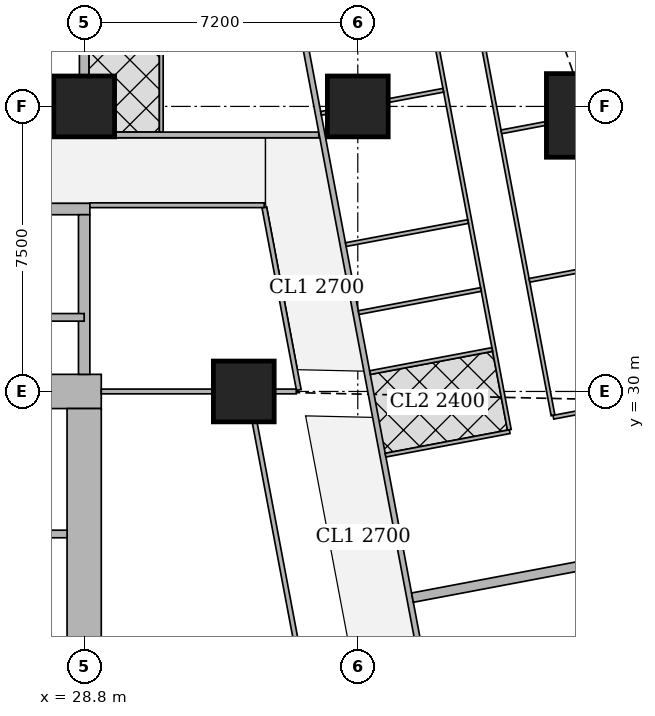
"""IFC4 building model, lengths in metres.
Left out: names, types, materials, properties, quantities, classifications, styles, units other than length and angle.
Written with IfcOpenShell. Run it as: python <this file> out.ifc"""

import sys

from ifc_helpers import new_model, si_unit, direction, frame, frame_2d, origin, origin_2d, place, context, subcontext, project, spatial, rectangle, extrude, element, fill, save


model = new_model("IFC4")
c1 = context("Model", 3, precision=1e-05, world=origin(), true_north=direction((0.0, 1.0)))
c2 = subcontext(c1, "Body", "Model", "MODEL_VIEW")
j1 = project(units=[si_unit("LENGTHUNIT", "METRE"), si_unit("PLANEANGLEUNIT", "RADIAN")], contexts=[c1])
p1 = place(None, origin())
s1 = spatial("IfcSite", under=j1, at=p1, CompositionType="ELEMENT")
p2 = place(p1, origin())
s2 = spatial("IfcBuilding", under=s1, at=p2, CompositionType="ELEMENT")
p3 = place(p2, frame((0.0, 0.0, 81.65)))
s3 = spatial("IfcBuildingStorey", under=s2, at=p3, CompositionType="ELEMENT", Elevation=81.65)
for number, where, z_axis, x_axis in (
    (1, (33.0, 30.0, 0.0), (0.0, 0.0, 1.0), (1.0, 0.0, 0.0)),
    (2, (28.8, 37.5, 0.0), (0.0, 0.0, 1.0), (1.0, 0.0, 0.0)),
    (3, (36.0, 37.5, 0.0), (0.0, 0.0, 1.0), (1.0, 0.0, 0.0)),
):
    element("IfcColumn", number, at=place(p3, frame(where, z_axis=z_axis, x_axis=x_axis)), inside=s3, PredefinedType="COLUMN", context=c2, shape_type="SweptSolid", body=[
        extrude(rectangle(XDim=1.6, YDim=1.6, at=origin_2d()), origin(), (0.0, 0.0, 1.0), 3.75),
    ])
p4 = place(p3, frame((42.064, 37.263, 0.0), z_axis=(0.0, 0.0, 1.0), x_axis=(1.0, 0.0, 0.0)))
e4 = element("IfcColumn", 4, at=p4, inside=s3, PredefinedType="COLUMN", context=c2, shape_type="SweptSolid", body=[
    extrude(rectangle(XDim=2.2, YDim=2.2, at=origin_2d()), origin(), (0.0, 0.0, 1.0), 3.75),
])
p5 = place(p3, frame((13.95, 30.0, 0.0), z_axis=(0.0, 0.0, 1.0), x_axis=(1.0, 0.0, 0.0)))
e5 = element("IfcWall", 5, at=p5, inside=s3, PredefinedType="SHEAR", context=c2, shape_type="SweptSolid", body=[
    extrude(rectangle(XDim=15.3, YDim=0.9, at=frame_2d((7.65, 0.0))), origin(), (0.0, 0.0, 1.0), 3.75),
])
p6 = place(p5, frame((4.45, 0.0, 0.0)))
e6 = element("IfcOpeningElement", 6, at=p6, cuts=e5, PredefinedType="OPENING", context=c2, shape_type="SweptSolid", body=[
    extrude(rectangle(XDim=1.8, YDim=2.1, at=frame_2d((0.9, 1.05))), frame((0.0, 0.46, 0.0), z_axis=(0.0, -1.0, 0.0), x_axis=(1.0, 0.0, 0.0)), (0.0, 0.0, 1.0), 0.92),
])
p7 = place(p5, frame((10.7, 0.0, 0.0)))
e7 = element("IfcOpeningElement", 7, at=p7, cuts=e5, PredefinedType="OPENING", context=c2, shape_type="SweptSolid", body=[
    extrude(rectangle(XDim=1.1, YDim=2.1, at=frame_2d((0.55, 1.05))), frame((0.0, 0.46, 0.0), z_axis=(0.0, -1.0, 0.0), x_axis=(1.0, 0.0, 0.0)), (0.0, 0.0, 1.0), 0.92),
])
p8 = place(p3, frame((28.8, 15.45, 0.0), z_axis=(0.0, 0.0, 1.0), x_axis=(0.0, 1.0, 0.0)))
e8 = element("IfcWall", 8, at=p8, inside=s3, PredefinedType="SHEAR", context=c2, shape_type="SweptSolid", body=[
    extrude(rectangle(XDim=14.1, YDim=0.9, at=frame_2d((7.05, 0.0))), origin(), (0.0, 0.0, 1.0), 3.75),
])
p9 = place(p3, frame((21.45, 34.8, 0.0), z_axis=(0.0, 0.0, 1.0), x_axis=(1.0, 0.0, 0.0)))
e9 = element("IfcWall", 9, at=p9, inside=s3, PredefinedType="SHEAR", context=c2, shape_type="SweptSolid", body=[
    extrude(rectangle(XDim=7.5, YDim=0.3, at=frame_2d((3.75, 0.0))), origin(), (0.0, 0.0, 1.0), 3.75),
])
p10 = place(p9, frame((0.5, 0.0, 0.0)))
e10 = element("IfcOpeningElement", 10, at=p10, cuts=e9, PredefinedType="OPENING", context=c2, shape_type="SweptSolid", body=[
    extrude(rectangle(XDim=1.1, YDim=2.1, at=frame_2d((0.55, 1.05))), frame((0.0, 0.16, 0.0), z_axis=(0.0, -1.0, 0.0), x_axis=(1.0, 0.0, 0.0)), (0.0, 0.0, 1.0), 0.32),
])
p11 = place(p3, frame((28.8, 30.45, 0.0), z_axis=(0.0, 0.0, 1.0), x_axis=(0.0, 1.0, 0.0)))
e11 = element("IfcWall", 11, at=p11, inside=s3, PredefinedType="SHEAR", context=c2, shape_type="SweptSolid", body=[
    extrude(rectangle(XDim=4.2, YDim=0.3, at=frame_2d((2.1, 0.0))), origin(), (0.0, 0.0, 1.0), 3.75),
])
p12 = place(p3, frame((22.401, 36.75, 0.0), z_axis=(0.0, 0.0, 1.0), x_axis=(1.0, 0.0, 0.0)))
e12 = element("IfcWall", 12, at=p12, inside=s3, PredefinedType="SOLIDWALL", context=c2, shape_type="SweptSolid", body=[
    extrude(rectangle(XDim=5.598, YDim=0.15, at=frame_2d((2.799, 0.0))), origin(), (0.0, 0.0, 1.0), 3.5),
])
p13 = place(p3, frame((29.601, 36.75, 0.0), z_axis=(0.0, 0.0, 1.0), x_axis=(1.0, 0.0, 0.0)))
e13 = element("IfcWall", 13, at=p13, inside=s3, PredefinedType="SOLIDWALL", context=c2, shape_type="SweptSolid", body=[
    extrude(rectangle(XDim=5.372, YDim=0.15, at=frame_2d((2.686, 0.0))), origin(), (0.0, 0.0, 1.0), 3.5),
])
p14 = place(p13, frame((2.845, 0.0, 0.0)))
e14 = element("IfcOpeningElement", 14, at=p14, cuts=e13, PredefinedType="OPENING", context=c2, shape_type="SweptSolid", body=[
    extrude(rectangle(XDim=1.0, YDim=2.1, at=frame_2d((0.5, 1.05))), frame((0.0, 0.085, 0.0), z_axis=(0.0, -1.0, 0.0), x_axis=(1.0, 0.0, 0.0)), (0.0, 0.0, 1.0), 0.17),
])
p15 = place(p3, frame((33.382, 45.65, 0.0), z_axis=(0.0, 0.0, 1.0), x_axis=(0.185593544777, -0.982626600565, 0.0)))
e15 = element("IfcWall", 15, at=p15, inside=s3, PredefinedType="SOLIDWALL", context=c2, shape_type="SweptSolid", body=[
    extrude(rectangle(XDim=47.118, YDim=0.15, at=frame_2d((23.559, 0.0))), origin(), (0.0, 0.0, 1.0), 2.2),
])
p16 = place(p15, frame((19.054, 0.0, 0.0)))
e16 = element("IfcOpeningElement", 16, at=p16, cuts=e15, PredefinedType="OPENING", context=c2, shape_type="SweptSolid", body=[
    extrude(rectangle(XDim=1.0, YDim=2.1, at=frame_2d((0.5, 1.05))), frame((0.0, 0.085, 0.0), z_axis=(0.0, -1.0, 0.0), x_axis=(1.0, 0.0, 0.0)), (0.0, 0.0, 1.0), 0.17),
])
p17 = place(p15, frame((22.87, 0.0, 0.0)))
e17 = element("IfcOpeningElement", 17, at=p17, cuts=e15, PredefinedType="OPENING", context=c2, shape_type="SweptSolid", body=[
    extrude(rectangle(XDim=1.0, YDim=2.1, at=frame_2d((0.5, 1.05))), frame((0.0, 0.085, 0.0), z_axis=(0.0, -1.0, 0.0), x_axis=(1.0, 0.0, 0.0)), (0.0, 0.0, 1.0), 0.17),
])
p18 = place(p15, frame((33.833, 0.0, 0.0)))
e18 = element("IfcOpeningElement", 18, at=p18, cuts=e15, PredefinedType="OPENING", context=c2, shape_type="SweptSolid", body=[
    extrude(rectangle(XDim=1.0, YDim=2.1, at=frame_2d((0.5, 1.05))), frame((0.0, 0.085, 0.0), z_axis=(0.0, -1.0, 0.0), x_axis=(1.0, 0.0, 0.0)), (0.0, 0.0, 1.0), 0.17),
])
p19 = place(p3, frame((38.862, 41.42, 0.0), z_axis=(0.0, 0.0, 1.0), x_axis=(0.185529020159, -0.982638785454, 0.0)))
e19 = element("IfcWall", 19, at=p19, inside=s3, PredefinedType="PARTITIONING", context=c2, shape_type="SweptSolid", body=[
    extrude(rectangle(XDim=12.262, YDim=0.1, at=frame_2d((6.131, 0.0))), origin(), (0.0, 0.0, 1.0), 2.5),
])
p20 = place(p19, frame((11.212, 0.0, 0.0)))
e20 = element("IfcOpeningElement", 20, at=p20, cuts=e19, PredefinedType="OPENING", context=c2, shape_type="SweptSolid", body=[
    extrude(rectangle(XDim=0.9, YDim=2.1, at=frame_2d((0.45, 1.05))), frame((0.0, 0.06, 0.0), z_axis=(0.0, -1.0, 0.0), x_axis=(1.0, 0.0, 0.0)), (0.0, 0.0, 1.0), 0.12),
])
p21 = place(p19, frame((7.555, 0.0, 0.0)))
e21 = element("IfcOpeningElement", 21, at=p21, cuts=e19, PredefinedType="OPENING", context=c2, shape_type="SweptSolid", body=[
    extrude(rectangle(XDim=0.9, YDim=2.1, at=frame_2d((0.45, 1.05))), frame((0.0, 0.06, 0.0), z_axis=(0.0, -1.0, 0.0), x_axis=(1.0, 0.0, 0.0)), (0.0, 0.0, 1.0), 0.12),
])
p22 = place(p19, frame((3.579, 0.0, 0.0)))
e22 = element("IfcOpeningElement", 22, at=p22, cuts=e19, PredefinedType="OPENING", context=c2, shape_type="SweptSolid", body=[
    extrude(rectangle(XDim=0.9, YDim=2.1, at=frame_2d((0.45, 1.05))), frame((0.0, 0.06, 0.0), z_axis=(0.0, -1.0, 0.0), x_axis=(1.0, 0.0, 0.0)), (0.0, 0.0, 1.0), 0.12),
])
p23 = place(p3, frame((37.473, 42.309, 0.0), z_axis=(0.0, 0.0, 1.0), x_axis=(0.185570636839, -0.982630927024, 0.0)))
e23 = element("IfcWall", 23, at=p23, inside=s3, PredefinedType="PARTITIONING", context=c2, shape_type="SweptSolid", body=[
    extrude(rectangle(XDim=13.553, YDim=0.1, at=frame_2d((6.777, 0.0))), origin(), (0.0, 0.0, 1.0), 2.5),
])
p24 = place(p23, frame((12.049, 0.0, 0.0)))
e24 = element("IfcOpeningElement", 24, at=p24, cuts=e23, PredefinedType="OPENING", context=c2, shape_type="SweptSolid", body=[
    extrude(rectangle(XDim=0.9, YDim=2.1, at=frame_2d((0.45, 1.05))), frame((0.0, 0.06, 0.0), z_axis=(0.0, -1.0, 0.0), x_axis=(1.0, 0.0, 0.0)), (0.0, 0.0, 1.0), 0.12),
])
p25 = place(p23, frame((8.427, 0.0, 0.0)))
e25 = element("IfcOpeningElement", 25, at=p25, cuts=e23, PredefinedType="OPENING", context=c2, shape_type="SweptSolid", body=[
    extrude(rectangle(XDim=0.9, YDim=2.1, at=frame_2d((0.45, 1.05))), frame((0.0, 0.06, 0.0), z_axis=(0.0, -1.0, 0.0), x_axis=(1.0, 0.0, 0.0)), (0.0, 0.0, 1.0), 0.12),
])
p26 = place(p23, frame((2.853, 0.0, 0.0)))
e26 = element("IfcOpeningElement", 26, at=p26, cuts=e23, PredefinedType="OPENING", context=c2, shape_type="SweptSolid", body=[
    extrude(rectangle(XDim=0.9, YDim=2.1, at=frame_2d((0.45, 1.05))), frame((0.0, 0.06, 0.0), z_axis=(0.0, -1.0, 0.0), x_axis=(1.0, 0.0, 0.0)), (0.0, 0.0, 1.0), 0.12),
])
p27 = place(p23, frame((10.14, 0.0, 0.0)))
e27 = element("IfcOpeningElement", 27, at=p27, cuts=e23, PredefinedType="OPENING", context=c2, shape_type="SweptSolid", body=[
    extrude(rectangle(XDim=0.9, YDim=2.1, at=frame_2d((0.45, 1.05))), frame((0.0, 0.06, 0.0), z_axis=(0.0, -1.0, 0.0), x_axis=(1.0, 0.0, 0.0)), (0.0, 0.0, 1.0), 0.12),
])
p28 = place(p23, frame((5.759, 0.0, 0.0)))
e28 = element("IfcOpeningElement", 28, at=p28, cuts=e23, PredefinedType="OPENING", context=c2, shape_type="SweptSolid", body=[
    extrude(rectangle(XDim=0.9, YDim=2.1, at=frame_2d((0.45, 1.05))), frame((0.0, 0.06, 0.0), z_axis=(0.0, -1.0, 0.0), x_axis=(1.0, 0.0, 0.0)), (0.0, 0.0, 1.0), 0.12),
])
p29 = place(p3, frame((40.954, 37.053, 0.0), z_axis=(0.0, 0.0, 1.0), x_axis=(-0.982628652346, -0.185582681276, 0.0)))
e29 = element("IfcWall", 29, at=p29, inside=s3, PredefinedType="PARTITIONING", context=c2, shape_type="SweptSolid", body=[
    extrude(rectangle(XDim=1.196, YDim=0.1, at=frame_2d((0.598, 0.0))), origin(), (0.0, 0.0, 1.0), 2.05),
])
p30 = place(p3, frame((44.693, 33.713, 0.0), z_axis=(0.0, 0.0, 1.0), x_axis=(-0.982623519589, -0.185609856287, 0.0)))
e30 = element("IfcWall", 30, at=p30, inside=s3, PredefinedType="PARTITIONING", context=c2, shape_type="SweptSolid", body=[
    extrude(rectangle(XDim=4.25, YDim=0.1, at=frame_2d((2.125, 0.0))), origin(), (0.0, 0.0, 1.0), 2.2),
])
p31 = place(p3, frame((42.37, 29.553, 0.0), z_axis=(0.0, 0.0, 1.0), x_axis=(-0.98263602344, -0.185543648338, 0.0)))
e31 = element("IfcWall", 31, at=p31, inside=s3, PredefinedType="PARTITIONING", context=c2, shape_type="SweptSolid", body=[
    extrude(rectangle(XDim=1.245, YDim=0.1, at=frame_2d((0.623, 0.0))), origin(), (0.0, 0.0, 1.0), 2.5),
])
p32 = place(p3, frame((38.25, 37.925, 0.0), z_axis=(0.0, 0.0, 1.0), x_axis=(-0.982626127294, -0.185596050493, 0.0)))
e32 = element("IfcWall", 32, at=p32, inside=s3, PredefinedType="PARTITIONING", context=c2, shape_type="SweptSolid", body=[
    extrude(rectangle(XDim=1.465, YDim=0.1, at=frame_2d((0.733, 0.0))), origin(), (0.0, 0.0, 1.0), 3.5),
])
p33 = place(p3, frame((35.19, 37.347, 0.0), z_axis=(0.0, 0.0, 1.0), x_axis=(-0.982404955251, -0.186763229514, 0.0)))
e33 = element("IfcWall", 33, at=p33, inside=s3, PredefinedType="PARTITIONING", context=c2, shape_type="SweptSolid", body=[
    extrude(rectangle(XDim=0.161, YDim=0.1, at=frame_2d((0.081, 0.0))), origin(), (0.0, 0.0, 1.0), 3.5),
])
p34 = place(p3, frame((39.24, 32.683, 0.0), z_axis=(0.0, 0.0, 1.0), x_axis=(-0.982607026909, -0.185697147715, 0.0)))
e34 = element("IfcWall", 34, at=p34, inside=s3, PredefinedType="PARTITIONING", context=c2, shape_type="SweptSolid", body=[
    extrude(rectangle(XDim=3.275, YDim=0.1, at=frame_2d((1.637, 0.0))), origin(), (0.0, 0.0, 1.0), 3.5),
])
p35 = place(p3, frame((39.997, 28.942, 0.0), z_axis=(0.0, 0.0, 1.0), x_axis=(-0.982569883123, -0.185893584556, 0.0)))
e35 = element("IfcWall", 35, at=p35, inside=s3, PredefinedType="PARTITIONING", context=c2, shape_type="SweptSolid", body=[
    extrude(rectangle(XDim=3.324, YDim=0.1, at=frame_2d((1.662, 0.0))), origin(), (0.0, 0.0, 1.0), 3.5),
])
p36 = place(p3, frame((39.538, 31.104, 0.0), z_axis=(0.0, 0.0, 1.0), x_axis=(-0.982610347627, -0.185679575441, 0.0)))
e36 = element("IfcWall", 36, at=p36, inside=s3, PredefinedType="PARTITIONING", context=c2, shape_type="SweptSolid", body=[
    extrude(rectangle(XDim=3.274, YDim=0.1, at=frame_2d((1.637, 0.0))), origin(), (0.0, 0.0, 1.0), 2.5),
])
p37 = place(p3, frame((38.902, 34.471, 0.0), z_axis=(0.0, 0.0, 1.0), x_axis=(-0.982664729897, -0.18539155487, 0.0)))
e37 = element("IfcWall", 37, at=p37, inside=s3, PredefinedType="PARTITIONING", context=c2, shape_type="SweptSolid", body=[
    extrude(rectangle(XDim=3.274, YDim=0.1, at=frame_2d((1.637, 0.0))), origin(), (0.0, 0.0, 1.0), 3.5),
])
p38 = place(p3, frame((41.885, 25.415, 0.0), z_axis=(0.0, 0.0, 1.0), x_axis=(-0.982612837616, -0.185666398014, 0.0)))
e38 = element("IfcWall", 38, at=p38, inside=s3, PredefinedType="SOLIDWALL", context=c2, shape_type="SweptSolid", body=[
    extrude(rectangle(XDim=4.525, YDim=0.25, at=frame_2d((2.262, 0.0))), origin(), (0.0, 0.0, 1.0), 3.5),
])
p39 = place(p3, frame((30.829, 36.825, 0.0), z_axis=(0.0, 0.0, 1.0), x_axis=(0.0, 1.0, 0.0)))
e39 = element("IfcWall", 39, at=p39, inside=s3, PredefinedType="PARTITIONING", context=c2, shape_type="SweptSolid", body=[
    extrude(rectangle(XDim=3.275, YDim=0.1, at=frame_2d((1.638, 0.0))), origin(), (0.0, 0.0, 1.0), 3.5),
])
p40 = place(p3, frame((28.8, 38.301, 0.0), z_axis=(0.0, 0.0, 1.0), x_axis=(0.0, 1.0, 0.0)))
e40 = element("IfcWall", 40, at=p40, inside=s3, PredefinedType="SOLIDWALL", context=c2, shape_type="SweptSolid", body=[
    extrude(rectangle(XDim=3.049, YDim=0.25, at=frame_2d((1.524, 0.0))), origin(), (0.0, 0.0, 1.0), 3.5),
])
p41 = place(p3, frame((28.95, 34.9, 0.0), z_axis=(0.0, 0.0, 1.0), x_axis=(1.0, 0.0, 0.0)))
e41 = element("IfcWall", 41, at=p41, inside=s3, PredefinedType="PARTITIONING", context=c2, shape_type="SweptSolid", body=[
    extrude(rectangle(XDim=4.588, YDim=0.125, at=frame_2d((2.294, 0.0))), origin(), (0.0, 0.0, 1.0), 3.5),
])
p42 = place(p3, frame((34.448, 30.04, 0.0), z_axis=(0.0, 0.0, 1.0), x_axis=(-0.185749459238, 0.982597139418, 0.0)))
e42 = element("IfcWall", 42, at=p42, inside=s3, PredefinedType="PARTITIONING", context=c2, shape_type="SweptSolid", body=[
    extrude(rectangle(XDim=4.883, YDim=0.125, at=frame_2d((2.441, 0.0))), origin(), (0.0, 0.0, 1.0), 2.5),
])
p43 = place(p42, frame((1.05, 0.0, 0.0)))
e43 = element("IfcOpeningElement", 43, at=p43, cuts=e42, PredefinedType="OPENING", context=c2, shape_type="SweptSolid", body=[
    extrude(rectangle(XDim=1.0, YDim=2.1, at=frame_2d((0.5, 1.05))), frame((0.0, 0.073, 0.0), z_axis=(0.0, -1.0, 0.0), x_axis=(1.0, 0.0, 0.0)), (0.0, 0.0, 1.0), 0.145),
])
p44 = place(p3, frame((34.535, 22.574, 0.0), z_axis=(0.0, 0.0, 1.0), x_axis=(-0.185591596381, 0.982626968566, 0.0)))
e44 = element("IfcWall", 44, at=p44, inside=s3, PredefinedType="PARTITIONING", context=c2, shape_type="SweptSolid", body=[
    extrude(rectangle(XDim=6.73, YDim=0.125, at=frame_2d((3.365, 0.0))), origin(), (0.0, 0.0, 1.0), 2.5),
])
p45 = place(p44, frame((3.241, 0.0, 0.0)))
e45 = element("IfcOpeningElement", 45, at=p45, cuts=e44, PredefinedType="OPENING", context=c2, shape_type="SweptSolid", body=[
    extrude(rectangle(XDim=1.0, YDim=2.1, at=frame_2d((0.5, 1.05))), frame((0.0, 0.073, 0.0), z_axis=(0.0, -1.0, 0.0), x_axis=(1.0, 0.0, 0.0)), (0.0, 0.0, 1.0), 0.145),
])
p46 = place(p3, frame((29.25, 30.0, 0.0), z_axis=(0.0, 0.0, 1.0), x_axis=(1.0, 0.0, 0.0)))
e46 = element("IfcWall", 46, at=p46, inside=s3, PredefinedType="PARTITIONING", context=c2, shape_type="SweptSolid", body=[
    extrude(rectangle(XDim=2.949, YDim=0.125, at=frame_2d((1.475, 0.0))), origin(), (0.0, 0.0, 1.0), 3.5),
])
p47 = place(p3, frame((33.801, 30.0, 0.0), z_axis=(0.0, 0.0, 1.0), x_axis=(1.0, 0.0, 0.0)))
e47 = element("IfcWall", 47, at=p47, inside=s3, PredefinedType="PARTITIONING", context=c2, shape_type="SweptSolid", body=[
    extrude(rectangle(XDim=0.579, YDim=0.125, at=frame_2d((0.29, 0.0))), origin(), (0.0, 0.0, 1.0), 2.5),
])
p48 = place(p3, frame((23.0, 31.95, 0.0), z_axis=(0.0, 0.0, 1.0), x_axis=(1.0, 0.0, 0.0)))
e48 = element("IfcWall", 48, at=p48, inside=s3, PredefinedType="SHEAR", context=c2, shape_type="SweptSolid", body=[
    extrude(rectangle(XDim=5.8, YDim=0.2, at=frame_2d((2.9, 0.0))), origin(), (0.0, 0.0, 1.0), 3.75),
])
p49 = place(p3, frame((27.4, 26.25, 0.0), z_axis=(0.0, 0.0, 1.0), x_axis=(1.0, 0.0, 0.0)))
e49 = element("IfcWall", 49, at=p49, inside=s3, PredefinedType="SOLIDWALL", context=c2, shape_type="SweptSolid", body=[
    extrude(rectangle(XDim=0.95, YDim=0.2, at=frame_2d((0.475, 0.0))), origin(), (0.0, 0.0, 1.0), 3.5),
])
p50 = place(p20, origin())
e50 = element("IfcDoor", 50, at=p50, inside=s3, OperationType="SINGLE_SWING_RIGHT", PredefinedType="DOOR", context=c2, shape_type="SweptSolid", body=[
    extrude(rectangle(XDim=0.9, YDim=2.1, at=frame_2d((0.45, 1.05))), frame((0.0, 0.025, 0.0), z_axis=(0.0, -1.0, 0.0), x_axis=(1.0, 0.0, 0.0)), (0.0, 0.0, 1.0), 0.05),
])
fill(e20, e50)
p51 = place(p21, origin())
e51 = element("IfcDoor", 51, at=p51, inside=s3, OperationType="SINGLE_SWING_RIGHT", PredefinedType="DOOR", context=c2, shape_type="SweptSolid", body=[
    extrude(rectangle(XDim=0.9, YDim=2.1, at=frame_2d((0.45, 1.05))), frame((0.0, 0.025, 0.0), z_axis=(0.0, -1.0, 0.0), x_axis=(1.0, 0.0, 0.0)), (0.0, 0.0, 1.0), 0.05),
])
fill(e21, e51)
p52 = place(p22, origin())
e52 = element("IfcDoor", 52, at=p52, inside=s3, OperationType="SINGLE_SWING_RIGHT", PredefinedType="DOOR", context=c2, shape_type="SweptSolid", body=[
    extrude(rectangle(XDim=0.9, YDim=2.1, at=frame_2d((0.45, 1.05))), frame((0.0, 0.025, 0.0), z_axis=(0.0, -1.0, 0.0), x_axis=(1.0, 0.0, 0.0)), (0.0, 0.0, 1.0), 0.05),
])
fill(e22, e52)
p53 = place(p24, origin())
e53 = element("IfcDoor", 53, at=p53, inside=s3, OperationType="SINGLE_SWING_LEFT", PredefinedType="DOOR", context=c2, shape_type="SweptSolid", body=[
    extrude(rectangle(XDim=0.9, YDim=2.1, at=frame_2d((0.45, 1.05))), frame((0.0, 0.025, 0.0), z_axis=(0.0, -1.0, 0.0), x_axis=(1.0, 0.0, 0.0)), (0.0, 0.0, 1.0), 0.05),
])
fill(e24, e53)
p54 = place(p25, origin())
e54 = element("IfcDoor", 54, at=p54, inside=s3, OperationType="SINGLE_SWING_RIGHT", PredefinedType="DOOR", context=c2, shape_type="SweptSolid", body=[
    extrude(rectangle(XDim=0.9, YDim=2.1, at=frame_2d((0.45, 1.05))), frame((0.0, 0.025, 0.0), z_axis=(0.0, -1.0, 0.0), x_axis=(1.0, 0.0, 0.0)), (0.0, 0.0, 1.0), 0.05),
])
fill(e25, e54)
p55 = place(p26, origin())
e55 = element("IfcDoor", 55, at=p55, inside=s3, OperationType="SINGLE_SWING_RIGHT", PredefinedType="DOOR", context=c2, shape_type="SweptSolid", body=[
    extrude(rectangle(XDim=0.9, YDim=2.1, at=frame_2d((0.45, 1.05))), frame((0.0, 0.025, 0.0), z_axis=(0.0, -1.0, 0.0), x_axis=(1.0, 0.0, 0.0)), (0.0, 0.0, 1.0), 0.05),
])
fill(e26, e55)
p56 = place(p27, origin())
e56 = element("IfcDoor", 56, at=p56, inside=s3, OperationType="SINGLE_SWING_LEFT", PredefinedType="DOOR", context=c2, shape_type="SweptSolid", body=[
    extrude(rectangle(XDim=0.9, YDim=2.1, at=frame_2d((0.45, 1.05))), frame((0.0, 0.025, 0.0), z_axis=(0.0, -1.0, 0.0), x_axis=(1.0, 0.0, 0.0)), (0.0, 0.0, 1.0), 0.05),
])
fill(e27, e56)
p57 = place(p28, origin())
e57 = element("IfcDoor", 57, at=p57, inside=s3, OperationType="SINGLE_SWING_LEFT", PredefinedType="DOOR", context=c2, shape_type="SweptSolid", body=[
    extrude(rectangle(XDim=0.9, YDim=2.1, at=frame_2d((0.45, 1.05))), frame((0.0, 0.025, 0.0), z_axis=(0.0, -1.0, 0.0), x_axis=(1.0, 0.0, 0.0)), (0.0, 0.0, 1.0), 0.05),
])
fill(e28, e57)
p58 = place(p16, origin())
e58 = element("IfcDoor", 58, at=p58, inside=s3, OperationType="SINGLE_SWING_RIGHT", PredefinedType="DOOR", context=c2, shape_type="SweptSolid", body=[
    extrude(rectangle(XDim=1.0, YDim=2.1, at=frame_2d((0.5, 1.05))), frame((0.0, 0.025, 0.0), z_axis=(0.0, -1.0, 0.0), x_axis=(1.0, 0.0, 0.0)), (0.0, 0.0, 1.0), 0.05),
])
fill(e16, e58)
p59 = place(p14, origin())
e59 = element("IfcDoor", 59, at=p59, inside=s3, OperationType="SINGLE_SWING_RIGHT", PredefinedType="DOOR", context=c2, shape_type="SweptSolid", body=[
    extrude(rectangle(XDim=1.0, YDim=2.1, at=frame_2d((0.5, 1.05))), frame((0.0, 0.025, 0.0), z_axis=(0.0, -1.0, 0.0), x_axis=(1.0, 0.0, 0.0)), (0.0, 0.0, 1.0), 0.05),
])
fill(e14, e59)
p60 = place(p45, origin())
e60 = element("IfcDoor", 60, at=p60, inside=s3, OperationType="SINGLE_SWING_RIGHT", PredefinedType="DOOR", context=c2, shape_type="SweptSolid", body=[
    extrude(rectangle(XDim=1.0, YDim=2.1, at=frame_2d((0.5, 1.05))), frame((0.0, 0.025, 0.0), z_axis=(0.0, -1.0, 0.0), x_axis=(1.0, 0.0, 0.0)), (0.0, 0.0, 1.0), 0.05),
])
fill(e45, e60)
p61 = place(p43, origin())
e61 = element("IfcDoor", 61, at=p61, inside=s3, OperationType="SINGLE_SWING_LEFT", PredefinedType="DOOR", context=c2, shape_type="SweptSolid", body=[
    extrude(rectangle(XDim=1.0, YDim=2.1, at=frame_2d((0.5, 1.05))), frame((0.0, 0.025, 0.0), z_axis=(0.0, -1.0, 0.0), x_axis=(1.0, 0.0, 0.0)), (0.0, 0.0, 1.0), 0.05),
])
fill(e43, e61)
save(model, sys.argv[1])
